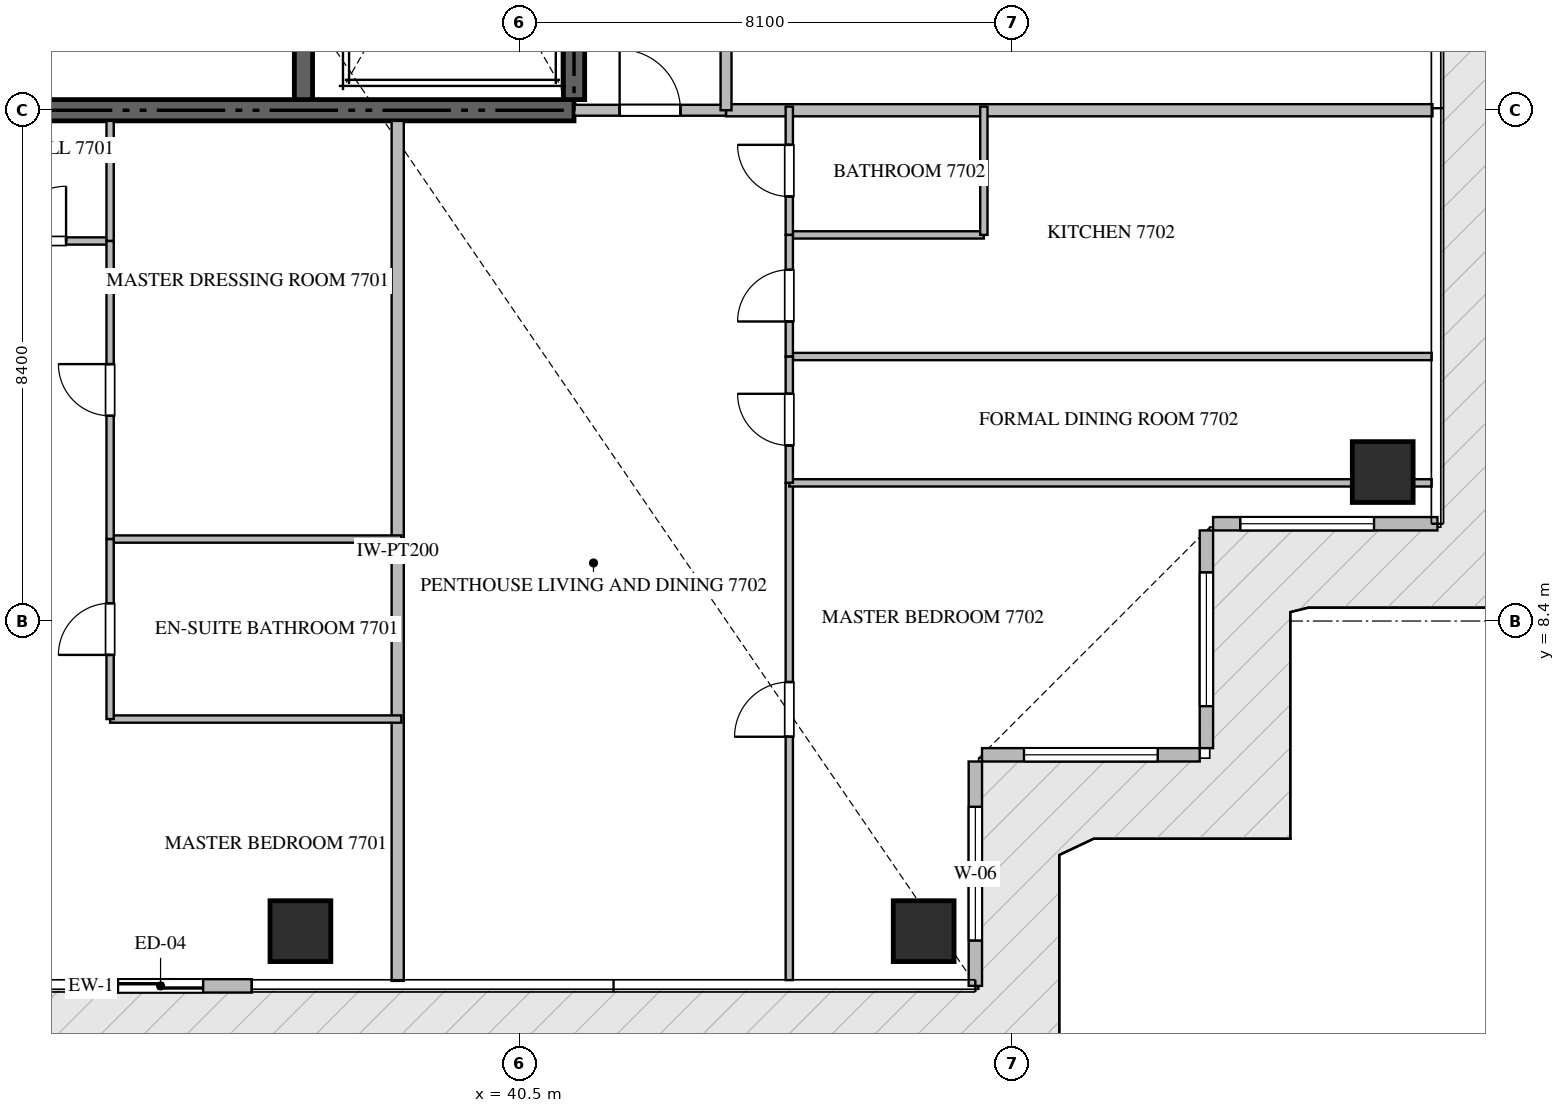
"""IFC4 building model, lengths in metres.
Left out: names, types, materials, properties, quantities, classifications, styles, units other than length and angle.
Written with IfcOpenShell. Run it as: python <this file> out.ifc"""

import sys

from ifc_helpers import new_model, si_unit, direction, frame, frame_2d, origin, origin_2d, place, context, subcontext, project, spatial, rectangle, extrude, source, transform, mapped, element, fill, save


model = new_model("IFC4")
c1 = context("Model", 3, precision=1e-05, world=origin(), true_north=direction((0.0, 1.0)))
c2 = subcontext(c1, "Body", "Model", "MODEL_VIEW")
j1 = project(units=[si_unit("LENGTHUNIT", "METRE"), si_unit("PLANEANGLEUNIT", "RADIAN")], contexts=[c1])
p1 = place(None, origin())
s1 = spatial("IfcSite", under=j1, at=p1, CompositionType="ELEMENT")
p2 = place(p1, origin())
s2 = spatial("IfcBuilding", under=s1, at=p2, CompositionType="ELEMENT")
p3 = place(p2, frame((0.0, 0.0, 309.65)))
s3 = spatial("IfcBuildingStorey", under=s2, at=p3, CompositionType="ELEMENT", Elevation=309.65)
p4 = place(p3, frame((23.4, 16.8, -0.26), z_axis=(0.0, 0.0, 1.0), x_axis=(1.0, 0.0, 0.0)))
e1 = element("IfcWall", 1, at=p4, inside=s3, PredefinedType="SHEAR", context=c2, shape_type="SweptSolid", body=[
    extrude(rectangle(XDim=18.0, YDim=0.35, at=frame_2d((9.0, 0.0))), origin(), (0.0, 0.0, 1.0), 4.048),
])
p5 = place(p3, frame((41.4, 16.975, -0.26), z_axis=(0.0, 0.0, 1.0), x_axis=(0.0, 1.0, 0.0)))
e2 = element("IfcWall", 2, at=p5, inside=s3, PredefinedType="SHEAR", context=c2, shape_type="SweptSolid", body=[
    extrude(rectangle(XDim=8.375, YDim=0.35, at=frame_2d((4.188, 0.0))), origin(), (0.0, 0.0, 1.0), 4.048),
])
p6 = place(p3, frame((36.95, 16.975, -0.26), z_axis=(0.0, 0.0, 1.0), x_axis=(0.0, 1.0, 0.0)))
e3 = element("IfcWall", 3, at=p6, inside=s3, PredefinedType="SHEAR", context=c2, shape_type="SweptSolid", body=[
    extrude(rectangle(XDim=8.375, YDim=0.3, at=frame_2d((4.188, 0.0))), origin(), (0.0, 0.0, 1.0), 4.048),
])
m1 = source(origin(), c2, "Body", "SweptSolid", [
    extrude(rectangle(XDim=1.0, YDim=1.0, at=origin_2d()), origin(), (0.0, 0.0, 1.0), 4.05),
])
for number, where, z_axis, x_axis in (
    (4, (36.9, 3.3, -0.26), (0.0, 0.0, 1.0), (1.0, 0.0, 0.0)),
    (5, (47.15, 3.3, -0.26), (0.0, 0.0, 1.0), (1.0, 0.0, 0.0)),
    (6, (54.7, 10.85, -0.26), (0.0, 0.0, 1.0), (1.0, 0.0, 0.0)),
):
    element("IfcColumn", number, at=place(p3, frame(where, z_axis=z_axis, x_axis=x_axis)), inside=s3, PredefinedType="COLUMN", context=c2, shape_type="MappedRepresentation", body=[
        mapped(m1, transform((0.0, 0.0, 0.0), scale=1.0)),
    ])
p7 = place(p3, frame((33.1, 2.4, 0.0), z_axis=(0.0, 0.0, 1.0), x_axis=(1.0, 0.0, 0.0)))
e7 = element("IfcWall", 7, at=p7, inside=s3, PredefinedType="ELEMENTEDWALL", context=c2, shape_type="SweptSolid", body=[
    extrude(rectangle(XDim=3.0, YDim=0.22, at=frame_2d((1.5, 0.0))), origin(), (0.0, 0.0, 1.0), 3.775),
])
p8 = place(p7, frame((0.8, 0.0, 0.0)))
e8 = element("IfcOpeningElement", 8, at=p8, cuts=e7, PredefinedType="OPENING", context=c2, shape_type="SweptSolid", body=[
    extrude(rectangle(XDim=1.4, YDim=2.25, at=frame_2d((0.7, 1.125))), frame((0.0, 0.12, 0.0), z_axis=(0.0, -1.0, 0.0), x_axis=(1.0, 0.0, 0.0)), (0.0, 0.0, 1.0), 0.24),
])
p9 = place(p3, frame((48.0, 2.4, 0.0), z_axis=(0.0, 0.0, 1.0), x_axis=(0.0, 1.0, 0.0)))
e9 = element("IfcWall", 9, at=p9, inside=s3, PredefinedType="ELEMENTEDWALL", context=c2, shape_type="SweptSolid", body=[
    extrude(rectangle(XDim=3.69, YDim=0.22, at=frame_2d((1.845, 0.0))), origin(), (0.0, 0.0, 1.0), 3.775),
])
p10 = place(p9, frame((0.745, 0.0, 0.65)))
e10 = element("IfcOpeningElement", 10, at=p10, cuts=e9, PredefinedType="OPENING", context=c2, shape_type="SweptSolid", body=[
    extrude(rectangle(XDim=2.2, YDim=2.4, at=frame_2d((1.1, 1.2))), frame((0.0, 0.12, 0.0), z_axis=(0.0, -1.0, 0.0), x_axis=(1.0, 0.0, 0.0)), (0.0, 0.0, 1.0), 0.24),
])
p11 = place(p3, frame((48.11, 6.2, 0.0), z_axis=(0.0, 0.0, 1.0), x_axis=(1.0, 0.0, 0.0)))
e11 = element("IfcWall", 11, at=p11, inside=s3, PredefinedType="ELEMENTEDWALL", context=c2, shape_type="SweptSolid", body=[
    extrude(rectangle(XDim=3.58, YDim=0.22, at=frame_2d((1.79, 0.0))), origin(), (0.0, 0.0, 1.0), 3.775),
])
p12 = place(p11, frame((0.69, 0.0, 0.65)))
e12 = element("IfcOpeningElement", 12, at=p12, cuts=e11, PredefinedType="OPENING", context=c2, shape_type="SweptSolid", body=[
    extrude(rectangle(XDim=2.2, YDim=2.4, at=frame_2d((1.1, 1.2))), frame((0.0, 0.12, 0.0), z_axis=(0.0, -1.0, 0.0), x_axis=(1.0, 0.0, 0.0)), (0.0, 0.0, 1.0), 0.24),
])
p13 = place(p3, frame((51.8, 6.31, 0.0), z_axis=(0.0, 0.0, 1.0), x_axis=(0.0, 1.0, 0.0)))
e13 = element("IfcWall", 13, at=p13, inside=s3, PredefinedType="ELEMENTEDWALL", context=c2, shape_type="SweptSolid", body=[
    extrude(rectangle(XDim=3.58, YDim=0.22, at=frame_2d((1.79, 0.0))), origin(), (0.0, 0.0, 1.0), 3.775),
])
p14 = place(p13, frame((0.69, 0.0, 0.65)))
e14 = element("IfcOpeningElement", 14, at=p14, cuts=e13, PredefinedType="OPENING", context=c2, shape_type="SweptSolid", body=[
    extrude(rectangle(XDim=2.2, YDim=2.4, at=frame_2d((1.1, 1.2))), frame((0.0, 0.12, 0.0), z_axis=(0.0, -1.0, 0.0), x_axis=(1.0, 0.0, 0.0)), (0.0, 0.0, 1.0), 0.24),
])
p15 = place(p3, frame((51.91, 10.0, 0.0), z_axis=(0.0, 0.0, 1.0), x_axis=(1.0, 0.0, 0.0)))
e15 = element("IfcWall", 15, at=p15, inside=s3, PredefinedType="ELEMENTEDWALL", context=c2, shape_type="SweptSolid", body=[
    extrude(rectangle(XDim=3.69, YDim=0.22, at=frame_2d((1.845, 0.0))), origin(), (0.0, 0.0, 1.0), 3.775),
])
p16 = place(p15, frame((0.447, 0.0, 0.65)))
e16 = element("IfcOpeningElement", 16, at=p16, cuts=e15, PredefinedType="OPENING", context=c2, shape_type="SweptSolid", body=[
    extrude(rectangle(XDim=2.2, YDim=2.4, at=frame_2d((1.1, 1.2))), frame((0.0, 0.12, 0.0), z_axis=(0.0, -1.0, 0.0), x_axis=(1.0, 0.0, 0.0)), (0.0, 0.0, 1.0), 0.24),
])
p17 = place(p3, frame((38.5, 2.482, 0.0), z_axis=(0.0, 0.0, 1.0), x_axis=(0.0, 1.0, 0.0)))
e17 = element("IfcWall", 17, at=p17, inside=s3, PredefinedType="PARTITIONING", context=c2, shape_type="SweptSolid", body=[
    extrude(rectangle(XDim=14.143, YDim=0.2, at=frame_2d((7.072, 0.0))), origin(), (0.0, 0.0, 1.0), 3.79),
])
p18 = place(p3, frame((43.9, 16.8, 0.0), z_axis=(0.0, 0.0, 1.0), x_axis=(1.0, 0.0, 0.0)))
e18 = element("IfcWall", 18, at=p18, inside=s3, PredefinedType="PARTITIONING", context=c2, shape_type="SweptSolid", body=[
    extrude(rectangle(XDim=11.618, YDim=0.2, at=frame_2d((5.809, 0.0))), origin(), (0.0, 0.0, 1.0), 3.79),
])
p19 = place(p3, frame((41.402, 16.8, 0.0), z_axis=(0.0, 0.0, 1.0), x_axis=(1.0, 0.0, 0.0)))
e19 = element("IfcWall", 19, at=p19, inside=s3, PredefinedType="PARTITIONING", context=c2, shape_type="SweptSolid", body=[
    extrude(rectangle(XDim=2.496, YDim=0.18, at=frame_2d((1.248, 0.0))), origin(), (0.0, 0.0, 1.0), 3.79),
])
p20 = place(p19, frame((0.748, 0.0, 0.0)))
e20 = element("IfcOpeningElement", 20, at=p20, cuts=e19, PredefinedType="OPENING", context=c2, shape_type="SweptSolid", body=[
    extrude(rectangle(XDim=1.0, YDim=2.15, at=frame_2d((0.5, 1.075))), frame((0.0, 0.1, 0.0), z_axis=(0.0, -1.0, 0.0), x_axis=(1.0, 0.0, 0.0)), (0.0, 0.0, 1.0), 0.2),
])
p21 = place(p3, frame((43.9, 16.8, 0.0), z_axis=(0.0, 0.0, 1.0), x_axis=(0.0, 1.0, 0.0)))
e21 = element("IfcWall", 21, at=p21, inside=s3, PredefinedType="PARTITIONING", context=c2, shape_type="SweptSolid", body=[
    extrude(rectangle(XDim=16.8, YDim=0.18, at=frame_2d((8.4, 0.0))), origin(), (0.0, 0.0, 1.0), 3.79),
])
p22 = place(p21, frame((2.575, 0.0, 0.0)))
e22 = element("IfcOpeningElement", 22, at=p22, cuts=e21, PredefinedType="OPENING", context=c2, shape_type="SweptSolid", body=[
    extrude(rectangle(XDim=1.0, YDim=2.15, at=frame_2d((0.5, 1.075))), frame((0.0, 0.1, 0.0), z_axis=(0.0, -1.0, 0.0), x_axis=(1.0, 0.0, 0.0)), (0.0, 0.0, 1.0), 0.2),
])
p23 = place(p21, frame((10.997, 0.0, 0.0)))
e23 = element("IfcOpeningElement", 23, at=p23, cuts=e21, PredefinedType="OPENING", context=c2, shape_type="SweptSolid", body=[
    extrude(rectangle(XDim=1.0, YDim=2.15, at=frame_2d((0.5, 1.075))), frame((0.0, 0.1, 0.0), z_axis=(0.0, -1.0, 0.0), x_axis=(1.0, 0.0, 0.0)), (0.0, 0.0, 1.0), 0.2),
])
p24 = place(p3, frame((31.422, 14.65, 0.0), z_axis=(0.0, 0.0, 1.0), x_axis=(1.0, 0.0, 0.0)))
e24 = element("IfcWall", 24, at=p24, inside=s3, PredefinedType="PARTITIONING", context=c2, shape_type="SweptSolid", body=[
    extrude(rectangle(XDim=2.348, YDim=0.12, at=frame_2d((1.174, 0.0))), origin(), (0.0, 0.0, 1.0), 3.79),
])
p25 = place(p24, frame((0.724, 0.0, 0.0)))
e25 = element("IfcOpeningElement", 25, at=p25, cuts=e24, PredefinedType="OPENING", context=c2, shape_type="SweptSolid", body=[
    extrude(rectangle(XDim=0.9, YDim=2.1, at=frame_2d((0.45, 1.05))), frame((0.0, 0.07, 0.0), z_axis=(0.0, -1.0, 0.0), x_axis=(1.0, 0.0, 0.0)), (0.0, 0.0, 1.0), 0.14),
])
for number, where, z_axis, x_axis in (
    (26, (33.77, 6.788, 0.0), (0.0, 0.0, 1.0), (1.0, 0.0, 0.0)),
    (27, (33.77, 9.748, 0.0), (0.0, 0.0, 1.0), (1.0, 0.0, 0.0)),
):
    element("IfcWall", number, at=place(p3, frame(where, z_axis=z_axis, x_axis=x_axis)), inside=s3, PredefinedType="PARTITIONING", context=c2, shape_type="SweptSolid", body=[
        extrude(rectangle(XDim=4.79, YDim=0.12, at=frame_2d((2.395, 0.0))), origin(), (0.0, 0.0, 1.0), 3.79),
    ])
p26 = place(p3, frame((33.77, 6.788, 0.0), z_axis=(0.0, 0.0, 1.0), x_axis=(0.0, 1.0, 0.0)))
e28 = element("IfcWall", 28, at=p26, inside=s3, PredefinedType="PARTITIONING", context=c2, shape_type="SweptSolid", body=[
    extrude(rectangle(XDim=2.96, YDim=0.12, at=frame_2d((1.48, 0.0))), origin(), (0.0, 0.0, 1.0), 3.79),
])
p27 = place(p26, frame((1.055, 0.0, 0.0)))
e29 = element("IfcOpeningElement", 29, at=p27, cuts=e28, PredefinedType="OPENING", context=c2, shape_type="SweptSolid", body=[
    extrude(rectangle(XDim=0.85, YDim=2.1, at=frame_2d((0.425, 1.05))), frame((0.0, 0.07, 0.0), z_axis=(0.0, -1.0, 0.0), x_axis=(1.0, 0.0, 0.0)), (0.0, 0.0, 1.0), 0.14),
])
p28 = place(p3, frame((33.77, 9.75, 0.0), z_axis=(0.0, 0.0, 1.0), x_axis=(0.0, 1.0, 0.0)))
e30 = element("IfcWall", 30, at=p28, inside=s3, PredefinedType="PARTITIONING", context=c2, shape_type="SweptSolid", body=[
    extrude(rectangle(XDim=4.9, YDim=0.12, at=frame_2d((2.45, 0.0))), origin(), (0.0, 0.0, 1.0), 3.79),
])
p29 = place(p28, frame((2.025, 0.0, 0.0)))
e31 = element("IfcOpeningElement", 31, at=p29, cuts=e30, PredefinedType="OPENING", context=c2, shape_type="SweptSolid", body=[
    extrude(rectangle(XDim=0.85, YDim=2.1, at=frame_2d((0.425, 1.05))), frame((0.0, 0.07, 0.0), z_axis=(0.0, -1.0, 0.0), x_axis=(1.0, 0.0, 0.0)), (0.0, 0.0, 1.0), 0.14),
])
p30 = place(p3, frame((33.77, 14.652, 0.0), z_axis=(0.0, 0.0, 1.0), x_axis=(0.0, 1.0, 0.0)))
e32 = element("IfcWall", 32, at=p30, inside=s3, PredefinedType="PARTITIONING", context=c2, shape_type="SweptSolid", body=[
    extrude(rectangle(XDim=1.973, YDim=0.12, at=frame_2d((0.986, 0.0))), origin(), (0.0, 0.0, 1.0), 3.79),
])
p31 = place(p3, frame((44.94, 2.495, 0.0), z_axis=(0.0, 0.0, 1.0), x_axis=(0.0, 1.0, 0.0)))
e33 = element("IfcWall", 33, at=p31, inside=s3, PredefinedType="PARTITIONING", context=c2, shape_type="SweptSolid", body=[
    extrude(rectangle(XDim=8.177, YDim=0.12, at=frame_2d((4.088, 0.0))), origin(), (0.0, 0.0, 1.0), 3.79),
])
p32 = place(p31, frame((4.002, 0.0, 0.0)))
e34 = element("IfcOpeningElement", 34, at=p32, cuts=e33, PredefinedType="OPENING", context=c2, shape_type="SweptSolid", body=[
    extrude(rectangle(XDim=0.9, YDim=2.1, at=frame_2d((0.45, 1.05))), frame((0.0, 0.07, 0.0), z_axis=(0.0, -1.0, 0.0), x_axis=(1.0, 0.0, 0.0)), (0.0, 0.0, 1.0), 0.14),
])
p33 = place(p3, frame((44.94, 10.672, 0.0), z_axis=(0.0, 0.0, 1.0), x_axis=(1.0, 0.0, 0.0)))
e35 = element("IfcWall", 35, at=p33, inside=s3, PredefinedType="PARTITIONING", context=c2, shape_type="SweptSolid", body=[
    extrude(rectangle(XDim=10.565, YDim=0.12, at=frame_2d((5.282, 0.0))), origin(), (0.0, 0.0, 1.0), 3.292),
])
p34 = place(p3, frame((44.94, 12.75, 0.0), z_axis=(0.0, 0.0, 1.0), x_axis=(1.0, 0.0, 0.0)))
e36 = element("IfcWall", 36, at=p34, inside=s3, PredefinedType="PARTITIONING", context=c2, shape_type="SweptSolid", body=[
    extrude(rectangle(XDim=10.565, YDim=0.12, at=frame_2d((5.282, 0.0))), origin(), (0.0, 0.0, 1.0), 3.79),
])
p35 = place(p3, frame((44.94, 14.75, 0.0), z_axis=(0.0, 0.0, 1.0), x_axis=(1.0, 0.0, 0.0)))
e37 = element("IfcWall", 37, at=p35, inside=s3, PredefinedType="PARTITIONING", context=c2, shape_type="SweptSolid", body=[
    extrude(rectangle(XDim=3.2, YDim=0.12, at=frame_2d((1.6, 0.0))), origin(), (0.0, 0.0, 1.0), 3.79),
])
p36 = place(p3, frame((48.14, 14.75, 0.0), z_axis=(0.0, 0.0, 1.0), x_axis=(0.0, 1.0, 0.0)))
e38 = element("IfcWall", 38, at=p36, inside=s3, PredefinedType="PARTITIONING", context=c2, shape_type="SweptSolid", body=[
    extrude(rectangle(XDim=2.11, YDim=0.12, at=frame_2d((1.055, 0.0))), origin(), (0.0, 0.0, 1.0), 3.79),
])
p37 = place(p3, frame((44.94, 10.674, 0.0), z_axis=(0.0, 0.0, 1.0), x_axis=(0.0, 1.0, 0.0)))
e39 = element("IfcWall", 39, at=p37, inside=s3, PredefinedType="PARTITIONING", context=c2, shape_type="SweptSolid", body=[
    extrude(rectangle(XDim=2.076, YDim=0.12, at=frame_2d((1.038, 0.0))), origin(), (0.0, 0.0, 1.0), 3.79),
])
p38 = place(p37, frame((0.613, 0.0, 0.0)))
e40 = element("IfcOpeningElement", 40, at=p38, cuts=e39, PredefinedType="OPENING", context=c2, shape_type="SweptSolid", body=[
    extrude(rectangle(XDim=0.85, YDim=2.1, at=frame_2d((0.425, 1.05))), frame((0.0, 0.07, 0.0), z_axis=(0.0, -1.0, 0.0), x_axis=(1.0, 0.0, 0.0)), (0.0, 0.0, 1.0), 0.14),
])
p39 = place(p3, frame((44.94, 12.752, 0.0), z_axis=(0.0, 0.0, 1.0), x_axis=(0.0, 1.0, 0.0)))
e41 = element("IfcWall", 41, at=p39, inside=s3, PredefinedType="PARTITIONING", context=c2, shape_type="SweptSolid", body=[
    extrude(rectangle(XDim=1.998, YDim=0.12, at=frame_2d((0.999, 0.0))), origin(), (0.0, 0.0, 1.0), 3.79),
])
p40 = place(p39, frame((0.574, 0.0, 0.0)))
e42 = element("IfcOpeningElement", 42, at=p40, cuts=e41, PredefinedType="OPENING", context=c2, shape_type="SweptSolid", body=[
    extrude(rectangle(XDim=0.85, YDim=2.1, at=frame_2d((0.425, 1.05))), frame((0.0, 0.07, 0.0), z_axis=(0.0, -1.0, 0.0), x_axis=(1.0, 0.0, 0.0)), (0.0, 0.0, 1.0), 0.14),
])
p41 = place(p3, frame((44.94, 14.752, 0.0), z_axis=(0.0, 0.0, 1.0), x_axis=(0.0, 1.0, 0.0)))
e43 = element("IfcWall", 43, at=p41, inside=s3, PredefinedType="PARTITIONING", context=c2, shape_type="SweptSolid", body=[
    extrude(rectangle(XDim=2.108, YDim=0.12, at=frame_2d((1.054, 0.0))), origin(), (0.0, 0.0, 1.0), 3.79),
])
p42 = place(p41, frame((0.629, 0.0, 0.0)))
e44 = element("IfcOpeningElement", 44, at=p42, cuts=e43, PredefinedType="OPENING", context=c2, shape_type="SweptSolid", body=[
    extrude(rectangle(XDim=0.85, YDim=2.1, at=frame_2d((0.425, 1.05))), frame((0.0, 0.07, 0.0), z_axis=(0.0, -1.0, 0.0), x_axis=(1.0, 0.0, 0.0)), (0.0, 0.0, 1.0), 0.14),
])
m2 = source(origin(), c2, "Body", "SweptSolid", [
    extrude(rectangle(XDim=1.4, YDim=2.25, at=frame_2d((0.7, 1.125))), frame((0.0, 0.025, 0.0), z_axis=(0.0, -1.0, 0.0), x_axis=(1.0, 0.0, 0.0)), (0.0, 0.0, 1.0), 0.05),
])
p43 = place(p8, origin())
e45 = element("IfcDoor", 45, at=p43, inside=s3, OperationType="SLIDING_TO_LEFT", PredefinedType="DOOR", context=c2, shape_type="MappedRepresentation", body=[
    mapped(m2, transform((0.0, 0.0, 0.0), scale=1.0)),
])
fill(e8, e45)
m3 = source(origin(), c2, "Body", "SweptSolid", [
    extrude(rectangle(XDim=2.2, YDim=2.4, at=frame_2d((1.1, 1.2))), frame((0.0, 0.03, 0.0), z_axis=(0.0, -1.0, 0.0), x_axis=(1.0, 0.0, 0.0)), (0.0, 0.0, 1.0), 0.06),
])
p44 = place(p10, origin())
e46 = element("IfcWindow", 46, at=p44, inside=s3, PartitioningType="SINGLE_PANEL", PredefinedType="WINDOW", context=c2, shape_type="MappedRepresentation", body=[
    mapped(m3, transform((0.0, 0.0, 0.0), scale=1.0)),
])
fill(e10, e46)
p45 = place(p12, origin())
e47 = element("IfcWindow", 47, at=p45, inside=s3, PartitioningType="SINGLE_PANEL", PredefinedType="WINDOW", context=c2, shape_type="MappedRepresentation", body=[
    mapped(m3, transform((0.0, 0.0, 0.0), scale=1.0)),
])
fill(e12, e47)
p46 = place(p14, origin())
e48 = element("IfcWindow", 48, at=p46, inside=s3, PartitioningType="SINGLE_PANEL", PredefinedType="WINDOW", context=c2, shape_type="MappedRepresentation", body=[
    mapped(m3, transform((0.0, 0.0, 0.0), scale=1.0)),
])
fill(e14, e48)
p47 = place(p16, origin())
e49 = element("IfcWindow", 49, at=p47, inside=s3, PartitioningType="SINGLE_PANEL", PredefinedType="WINDOW", context=c2, shape_type="MappedRepresentation", body=[
    mapped(m3, transform((0.0, 0.0, 0.0), scale=1.0)),
])
fill(e16, e49)
m4 = source(origin(), c2, "Body", "SweptSolid", [
    extrude(rectangle(XDim=1.0, YDim=2.15, at=frame_2d((0.5, 1.075))), frame((0.0, 0.025, 0.0), z_axis=(0.0, -1.0, 0.0), x_axis=(1.0, 0.0, 0.0)), (0.0, 0.0, 1.0), 0.05),
])
p48 = place(p20, origin())
e50 = element("IfcDoor", 50, at=p48, inside=s3, OperationType="SINGLE_SWING_LEFT", PredefinedType="DOOR", context=c2, shape_type="MappedRepresentation", body=[
    mapped(m4, transform((0.0, 0.0, 0.0), scale=1.0)),
])
fill(e20, e50)
m5 = source(origin(), c2, "Body", "SweptSolid", [
    extrude(rectangle(XDim=0.9, YDim=2.1, at=frame_2d((0.45, 1.05))), frame((0.0, 0.025, 0.0), z_axis=(0.0, -1.0, 0.0), x_axis=(1.0, 0.0, 0.0)), (0.0, 0.0, 1.0), 0.05),
])
p49 = place(p25, origin())
e51 = element("IfcDoor", 51, at=p49, inside=s3, OperationType="SINGLE_SWING_RIGHT", PredefinedType="DOOR", context=c2, shape_type="MappedRepresentation", body=[
    mapped(m5, transform((0.0, 0.0, 0.0), scale=1.0)),
])
fill(e25, e51)
m6 = source(origin(), c2, "Body", "SweptSolid", [
    extrude(rectangle(XDim=0.85, YDim=2.1, at=frame_2d((0.425, 1.05))), frame((0.0, 0.025, 0.0), z_axis=(0.0, -1.0, 0.0), x_axis=(1.0, 0.0, 0.0)), (0.0, 0.0, 1.0), 0.05),
])
p50 = place(p27, origin())
e52 = element("IfcDoor", 52, at=p50, inside=s3, OperationType="SINGLE_SWING_LEFT", PredefinedType="DOOR", context=c2, shape_type="MappedRepresentation", body=[
    mapped(m6, transform((0.0, 0.0, 0.0), scale=1.0)),
])
fill(e29, e52)
p51 = place(p29, origin())
e53 = element("IfcDoor", 53, at=p51, inside=s3, OperationType="SINGLE_SWING_RIGHT", PredefinedType="DOOR", context=c2, shape_type="MappedRepresentation", body=[
    mapped(m6, transform((0.0, 0.0, 0.0), scale=1.0)),
])
fill(e31, e53)
p52 = place(p32, origin())
e54 = element("IfcDoor", 54, at=p52, inside=s3, OperationType="SINGLE_SWING_LEFT", PredefinedType="DOOR", context=c2, shape_type="MappedRepresentation", body=[
    mapped(m5, transform((0.0, 0.0, 0.0), scale=1.0)),
])
fill(e34, e54)
p53 = place(p38, origin())
e55 = element("IfcDoor", 55, at=p53, inside=s3, OperationType="SINGLE_SWING_RIGHT", PredefinedType="DOOR", context=c2, shape_type="MappedRepresentation", body=[
    mapped(m6, transform((0.0, 0.0, 0.0), scale=1.0)),
])
fill(e40, e55)
p54 = place(p40, origin())
e56 = element("IfcDoor", 56, at=p54, inside=s3, OperationType="SINGLE_SWING_LEFT", PredefinedType="DOOR", context=c2, shape_type="MappedRepresentation", body=[
    mapped(m6, transform((0.0, 0.0, 0.0), scale=1.0)),
])
fill(e42, e56)
p55 = place(p42, origin())
e57 = element("IfcDoor", 57, at=p55, inside=s3, OperationType="SINGLE_SWING_RIGHT", PredefinedType="DOOR", context=c2, shape_type="MappedRepresentation", body=[
    mapped(m6, transform((0.0, 0.0, 0.0), scale=1.0)),
])
fill(e44, e57)
save(model, sys.argv[1])
